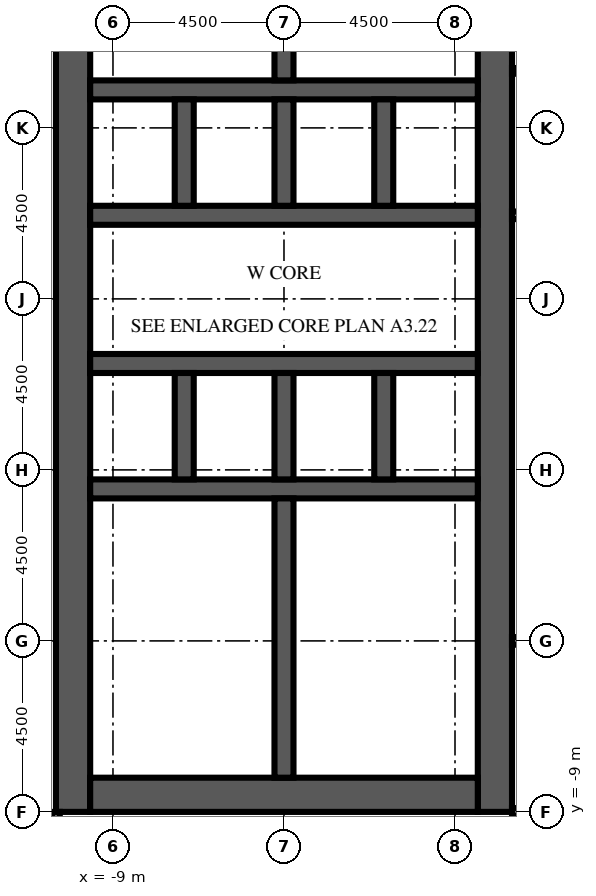
"""IFC4 building model, lengths in metres.
Left out: names, types, materials, properties, quantities, classifications, styles, units other than length and angle.
Written with IfcOpenShell. Run it as: python <this file> out.ifc"""

import sys

from ifc_helpers import new_model, si_unit, direction, frame, frame_2d, origin, place, context, subcontext, project, spatial, rectangle, extrude, element, fill, save


model = new_model("IFC4")
c1 = context("Model", 3, precision=1e-05, world=origin(), true_north=direction((0.0, 1.0)))
c2 = subcontext(c1, "Body", "Model", "MODEL_VIEW")
j1 = project(units=[si_unit("LENGTHUNIT", "METRE"), si_unit("PLANEANGLEUNIT", "RADIAN")], contexts=[c1])
p1 = place(None, origin())
s1 = spatial("IfcSite", under=j1, at=p1, CompositionType="ELEMENT")
p2 = place(p1, origin())
s2 = spatial("IfcBuilding", under=s1, at=p2, CompositionType="ELEMENT")
p3 = place(p2, frame((0.0, 0.0, 141.3)))
s3 = spatial("IfcBuildingStorey", under=s2, at=p3, CompositionType="ELEMENT", Elevation=141.3)
p4 = place(p3, frame((-10.05, -9.0, 0.0), z_axis=(0.0, 0.0, 1.0), x_axis=(0.0, 1.0, 0.0)))
e1 = element("IfcWall", 1, at=p4, inside=s3, PredefinedType="SHEAR", context=c2, shape_type="SweptSolid", body=[
    extrude(rectangle(XDim=27.5, YDim=0.9, at=frame_2d((13.75, 0.0))), origin(), (0.0, 0.0, 1.0), 4.1),
])
p5 = place(p4, frame((12.55, 0.0, 0.0)))
e2 = element("IfcOpeningElement", 2, at=p5, cuts=e1, PredefinedType="OPENING", context=c2, shape_type="SweptSolid", body=[
    extrude(rectangle(XDim=2.4, YDim=2.4, at=frame_2d((1.2, 1.2))), frame((0.0, 0.46, 0.0), z_axis=(0.0, -1.0, 0.0), x_axis=(1.0, 0.0, 0.0)), (0.0, 0.0, 1.0), 0.92),
])
p6 = place(p4, frame((6.825, 0.0, 0.0)))
e3 = element("IfcOpeningElement", 3, at=p6, cuts=e1, PredefinedType="OPENING", context=c2, shape_type="SweptSolid", body=[
    extrude(rectangle(XDim=1.2, YDim=2.1, at=frame_2d((0.6, 1.05))), frame((0.0, 0.46, 0.0), z_axis=(0.0, -1.0, 0.0), x_axis=(1.0, 0.0, 0.0)), (0.0, 0.0, 1.0), 0.92),
])
p7 = place(p4, frame((19.475, 0.0, 0.0)))
e4 = element("IfcOpeningElement", 4, at=p7, cuts=e1, PredefinedType="OPENING", context=c2, shape_type="SweptSolid", body=[
    extrude(rectangle(XDim=1.2, YDim=2.1, at=frame_2d((0.6, 1.05))), frame((0.0, 0.46, 0.0), z_axis=(0.0, -1.0, 0.0), x_axis=(1.0, 0.0, 0.0)), (0.0, 0.0, 1.0), 0.92),
])
p8 = place(p3, frame((1.05, -9.0, 0.0), z_axis=(0.0, 0.0, 1.0), x_axis=(0.0, 1.0, 0.0)))
e5 = element("IfcWall", 5, at=p8, inside=s3, PredefinedType="SHEAR", context=c2, shape_type="SweptSolid", body=[
    extrude(rectangle(XDim=27.5, YDim=0.9, at=frame_2d((13.75, 0.0))), origin(), (0.0, 0.0, 1.0), 4.1),
])
p9 = place(p8, frame((12.55, 0.0, 0.0)))
e6 = element("IfcOpeningElement", 6, at=p9, cuts=e5, PredefinedType="OPENING", context=c2, shape_type="SweptSolid", body=[
    extrude(rectangle(XDim=2.4, YDim=2.4, at=frame_2d((1.2, 1.2))), frame((0.0, 0.46, 0.0), z_axis=(0.0, -1.0, 0.0), x_axis=(1.0, 0.0, 0.0)), (0.0, 0.0, 1.0), 0.92),
])
p10 = place(p8, frame((5.51, 0.0, 0.0)))
e7 = element("IfcOpeningElement", 7, at=p10, cuts=e5, PredefinedType="OPENING", context=c2, shape_type="SweptSolid", body=[
    extrude(rectangle(XDim=0.923, YDim=2.1, at=frame_2d((0.461, 1.05))), frame((0.0, 0.46, 0.0), z_axis=(0.0, -1.0, 0.0), x_axis=(1.0, 0.0, 0.0)), (0.0, 0.0, 1.0), 0.92),
])
p11 = place(p8, frame((23.427, 0.0, 0.0)))
e8 = element("IfcOpeningElement", 8, at=p11, cuts=e5, PredefinedType="OPENING", context=c2, shape_type="SweptSolid", body=[
    extrude(rectangle(XDim=1.2, YDim=2.1, at=frame_2d((0.6, 1.05))), frame((0.0, 0.46, 0.0), z_axis=(0.0, -1.0, 0.0), x_axis=(1.0, 0.0, 0.0)), (0.0, 0.0, 1.0), 0.92),
])
p12 = place(p3, frame((-9.6, -8.55, 0.0), z_axis=(0.0, 0.0, 1.0), x_axis=(1.0, 0.0, 0.0)))
e9 = element("IfcWall", 9, at=p12, inside=s3, PredefinedType="SHEAR", context=c2, shape_type="SweptSolid", body=[
    extrude(rectangle(XDim=10.2, YDim=0.9, at=frame_2d((5.1, 0.0))), origin(), (0.0, 0.0, 1.0), 4.1),
])
p13 = place(p3, frame((-9.6, -0.5, 0.0), z_axis=(0.0, 0.0, 1.0), x_axis=(1.0, 0.0, 0.0)))
e10 = element("IfcWall", 10, at=p13, inside=s3, PredefinedType="SHEAR", context=c2, shape_type="SweptSolid", body=[
    extrude(rectangle(XDim=10.2, YDim=0.5, at=frame_2d((5.1, 0.0))), origin(), (0.0, 0.0, 1.0), 4.1),
])
p14 = place(p3, frame((-9.6, 2.8, 0.0), z_axis=(0.0, 0.0, 1.0), x_axis=(1.0, 0.0, 0.0)))
e11 = element("IfcWall", 11, at=p14, inside=s3, PredefinedType="SHEAR", context=c2, shape_type="SweptSolid", body=[
    extrude(rectangle(XDim=10.2, YDim=0.5, at=frame_2d((5.1, 0.0))), origin(), (0.0, 0.0, 1.0), 4.1),
])
p15 = place(p14, frame((0.562, 0.0, 0.0)))
e12 = element("IfcOpeningElement", 12, at=p15, cuts=e11, PredefinedType="OPENING", context=c2, shape_type="SweptSolid", body=[
    extrude(rectangle(XDim=1.1, YDim=2.1, at=frame_2d((0.55, 1.05))), frame((0.0, 0.26, 0.0), z_axis=(0.0, -1.0, 0.0), x_axis=(1.0, 0.0, 0.0)), (0.0, 0.0, 1.0), 0.52),
])
p16 = place(p14, frame((3.238, 0.0, 0.0)))
e13 = element("IfcOpeningElement", 13, at=p16, cuts=e11, PredefinedType="OPENING", context=c2, shape_type="SweptSolid", body=[
    extrude(rectangle(XDim=1.1, YDim=2.1, at=frame_2d((0.55, 1.05))), frame((0.0, 0.26, 0.0), z_axis=(0.0, -1.0, 0.0), x_axis=(1.0, 0.0, 0.0)), (0.0, 0.0, 1.0), 0.52),
])
p17 = place(p14, frame((8.538, 0.0, 0.0)))
e14 = element("IfcOpeningElement", 14, at=p17, cuts=e11, PredefinedType="OPENING", context=c2, shape_type="SweptSolid", body=[
    extrude(rectangle(XDim=1.1, YDim=2.1, at=frame_2d((0.55, 1.05))), frame((0.0, 0.26, 0.0), z_axis=(0.0, -1.0, 0.0), x_axis=(1.0, 0.0, 0.0)), (0.0, 0.0, 1.0), 0.52),
])
p18 = place(p3, frame((-9.6, 6.7, 0.0), z_axis=(0.0, 0.0, 1.0), x_axis=(1.0, 0.0, 0.0)))
e15 = element("IfcWall", 15, at=p18, inside=s3, PredefinedType="SHEAR", context=c2, shape_type="SweptSolid", body=[
    extrude(rectangle(XDim=10.2, YDim=0.5, at=frame_2d((5.1, 0.0))), origin(), (0.0, 0.0, 1.0), 4.1),
])
p19 = place(p18, frame((0.562, 0.0, 0.0)))
e16 = element("IfcOpeningElement", 16, at=p19, cuts=e15, PredefinedType="OPENING", context=c2, shape_type="SweptSolid", body=[
    extrude(rectangle(XDim=1.1, YDim=2.1, at=frame_2d((0.55, 1.05))), frame((0.0, 0.26, 0.0), z_axis=(0.0, -1.0, 0.0), x_axis=(1.0, 0.0, 0.0)), (0.0, 0.0, 1.0), 0.52),
])
p20 = place(p18, frame((3.288, 0.0, 0.0)))
e17 = element("IfcOpeningElement", 17, at=p20, cuts=e15, PredefinedType="OPENING", context=c2, shape_type="SweptSolid", body=[
    extrude(rectangle(XDim=1.0, YDim=2.1, at=frame_2d((0.5, 1.05))), frame((0.0, 0.26, 0.0), z_axis=(0.0, -1.0, 0.0), x_axis=(1.0, 0.0, 0.0)), (0.0, 0.0, 1.0), 0.52),
])
p21 = place(p18, frame((5.913, 0.0, 0.0)))
e18 = element("IfcOpeningElement", 18, at=p21, cuts=e15, PredefinedType="OPENING", context=c2, shape_type="SweptSolid", body=[
    extrude(rectangle(XDim=1.0, YDim=2.1, at=frame_2d((0.5, 1.05))), frame((0.0, 0.26, 0.0), z_axis=(0.0, -1.0, 0.0), x_axis=(1.0, 0.0, 0.0)), (0.0, 0.0, 1.0), 0.52),
])
p22 = place(p18, frame((8.587, 0.0, 0.0)))
e19 = element("IfcOpeningElement", 19, at=p22, cuts=e15, PredefinedType="OPENING", context=c2, shape_type="SweptSolid", body=[
    extrude(rectangle(XDim=1.0, YDim=2.1, at=frame_2d((0.5, 1.05))), frame((0.0, 0.26, 0.0), z_axis=(0.0, -1.0, 0.0), x_axis=(1.0, 0.0, 0.0)), (0.0, 0.0, 1.0), 0.52),
])
p23 = place(p3, frame((-9.6, 10.0, 0.0), z_axis=(0.0, 0.0, 1.0), x_axis=(1.0, 0.0, 0.0)))
e20 = element("IfcWall", 20, at=p23, inside=s3, PredefinedType="SHEAR", context=c2, shape_type="SweptSolid", body=[
    extrude(rectangle(XDim=10.2, YDim=0.5, at=frame_2d((5.1, 0.0))), origin(), (0.0, 0.0, 1.0), 4.1),
])
for number, where, z_axis, x_axis in (
    (21, (-7.125, -0.25, 0.0), (0.0, 0.0, 1.0), (0.0, 1.0, 0.0)),
    (22, (-7.125, 6.95, 0.0), (0.0, 0.0, 1.0), (0.0, 1.0, 0.0)),
    (23, (-4.5, -0.25, 0.0), (0.0, 0.0, 1.0), (0.0, 1.0, 0.0)),
    (24, (-4.5, 6.95, 0.0), (0.0, 0.0, 1.0), (0.0, 1.0, 0.0)),
    (25, (-1.875, -0.25, 0.0), (0.0, 0.0, 1.0), (0.0, 1.0, 0.0)),
    (26, (-1.875, 6.95, 0.0), (0.0, 0.0, 1.0), (0.0, 1.0, 0.0)),
):
    element("IfcWall", number, at=place(p3, frame(where, z_axis=z_axis, x_axis=x_axis)), inside=s3, PredefinedType="SHEAR", context=c2, shape_type="SweptSolid", body=[
        extrude(rectangle(XDim=2.8, YDim=0.5, at=frame_2d((1.4, 0.0))), origin(), (0.0, 0.0, 1.0), 4.1),
    ])
for number, where, z_axis, x_axis in (
    (27, (-4.5, -8.1, 0.0), (0.0, 0.0, 1.0), (0.0, 1.0, 0.0)),
    (28, (-4.5, 10.25, 0.0), (0.0, 0.0, 1.0), (0.0, 1.0, 0.0)),
):
    element("IfcWall", number, at=place(p3, frame(where, z_axis=z_axis, x_axis=x_axis)), inside=s3, PredefinedType="SHEAR", context=c2, shape_type="SweptSolid", body=[
        extrude(rectangle(XDim=7.35, YDim=0.5, at=frame_2d((3.675, 0.0))), origin(), (0.0, 0.0, 1.0), 4.1),
    ])
p24 = place(p3, frame((-1.825, -3.69, 0.0), z_axis=(0.0, 0.0, 1.0), x_axis=(1.0, 0.0, 0.0)))
e29 = element("IfcWall", 29, at=p24, inside=s3, PredefinedType="PARTITIONING", context=c2, shape_type="SweptSolid", body=[
    extrude(rectangle(XDim=2.425, YDim=0.1, at=frame_2d((1.212, 0.0))), origin(), (0.0, 0.0, 1.0), 3.5),
])
p25 = place(p24, frame((0.712, 0.0, 0.0)))
e30 = element("IfcOpeningElement", 30, at=p25, cuts=e29, PredefinedType="OPENING", context=c2, shape_type="SweptSolid", body=[
    extrude(rectangle(XDim=1.0, YDim=2.1, at=frame_2d((0.5, 1.05))), frame((0.0, 0.06, 0.0), z_axis=(0.0, -1.0, 0.0), x_axis=(1.0, 0.0, 0.0)), (0.0, 0.0, 1.0), 0.12),
])
p26 = place(p3, frame((-4.25, -3.69, 0.0), z_axis=(0.0, 0.0, 1.0), x_axis=(1.0, 0.0, 0.0)))
e31 = element("IfcWall", 31, at=p26, inside=s3, PredefinedType="PARTITIONING", context=c2, shape_type="SweptSolid", body=[
    extrude(rectangle(XDim=2.425, YDim=0.1, at=frame_2d((1.212, 0.0))), origin(), (0.0, 0.0, 1.0), 3.5),
])
p27 = place(p26, frame((0.712, 0.0, 0.0)))
e32 = element("IfcOpeningElement", 32, at=p27, cuts=e31, PredefinedType="OPENING", context=c2, shape_type="SweptSolid", body=[
    extrude(rectangle(XDim=1.0, YDim=2.1, at=frame_2d((0.5, 1.05))), frame((0.0, 0.06, 0.0), z_axis=(0.0, -1.0, 0.0), x_axis=(1.0, 0.0, 0.0)), (0.0, 0.0, 1.0), 0.12),
])
p28 = place(p3, frame((-1.825, -2.367, 0.0), z_axis=(0.0, 0.0, 1.0), x_axis=(1.0, 0.0, 0.0)))
e33 = element("IfcWall", 33, at=p28, inside=s3, PredefinedType="PARTITIONING", context=c2, shape_type="SweptSolid", body=[
    extrude(rectangle(XDim=2.425, YDim=0.1, at=frame_2d((1.212, 0.0))), origin(), (0.0, 0.0, 1.0), 3.5),
])
p29 = place(p28, frame((0.712, 0.0, 0.0)))
e34 = element("IfcOpeningElement", 34, at=p29, cuts=e33, PredefinedType="OPENING", context=c2, shape_type="SweptSolid", body=[
    extrude(rectangle(XDim=1.0, YDim=2.1, at=frame_2d((0.5, 1.05))), frame((0.0, 0.06, 0.0), z_axis=(0.0, -1.0, 0.0), x_axis=(1.0, 0.0, 0.0)), (0.0, 0.0, 1.0), 0.12),
])
p30 = place(p3, frame((-4.25, -2.367, 0.0), z_axis=(0.0, 0.0, 1.0), x_axis=(1.0, 0.0, 0.0)))
e35 = element("IfcWall", 35, at=p30, inside=s3, PredefinedType="PARTITIONING", context=c2, shape_type="SweptSolid", body=[
    extrude(rectangle(XDim=2.425, YDim=0.1, at=frame_2d((1.212, 0.0))), origin(), (0.0, 0.0, 1.0), 3.5),
])
p31 = place(p30, frame((0.712, 0.0, 0.0)))
e36 = element("IfcOpeningElement", 36, at=p31, cuts=e35, PredefinedType="OPENING", context=c2, shape_type="SweptSolid", body=[
    extrude(rectangle(XDim=1.0, YDim=2.1, at=frame_2d((0.5, 1.05))), frame((0.0, 0.06, 0.0), z_axis=(0.0, -1.0, 0.0), x_axis=(1.0, 0.0, 0.0)), (0.0, 0.0, 1.0), 0.12),
])
p32 = place(p3, frame((-1.825, -8.1, 0.0), z_axis=(0.0, 0.0, 1.0), x_axis=(0.0, 1.0, 0.0)))
e37 = element("IfcWall", 37, at=p32, inside=s3, PredefinedType="PARTITIONING", context=c2, shape_type="SweptSolid", body=[
    extrude(rectangle(XDim=4.41, YDim=0.1, at=frame_2d((2.205, 0.0))), origin(), (0.0, 0.0, 1.0), 3.5),
])
p33 = place(p3, frame((-1.825, -2.367, 0.0), z_axis=(0.0, 0.0, 1.0), x_axis=(0.0, 1.0, 0.0)))
e38 = element("IfcWall", 38, at=p33, inside=s3, PredefinedType="PARTITIONING", context=c2, shape_type="SweptSolid", body=[
    extrude(rectangle(XDim=1.617, YDim=0.1, at=frame_2d((0.809, 0.0))), origin(), (0.0, 0.0, 1.0), 3.5),
])
p34 = place(p3, frame((-10.5, -9.0, 0.0), z_axis=(0.0, 0.0, 1.0), x_axis=(0.0, -1.0, 0.0)))
e39 = element("IfcWall", 39, at=p34, inside=s3, PredefinedType="PARTITIONING", context=c2, shape_type="SweptSolid", body=[
    extrude(rectangle(XDim=13.35, YDim=0.2, at=frame_2d((6.675, 0.0))), origin(), (0.0, 0.0, 1.0), 3.5),
])
p35 = place(p34, frame((4.4, 0.0, 0.0)))
e40 = element("IfcOpeningElement", 40, at=p35, cuts=e39, PredefinedType="OPENING", context=c2, shape_type="SweptSolid", body=[
    extrude(rectangle(XDim=1.0, YDim=2.1, at=frame_2d((0.5, 1.05))), frame((0.0, 0.11, 0.0), z_axis=(0.0, -1.0, 0.0), x_axis=(1.0, 0.0, 0.0)), (0.0, 0.0, 1.0), 0.22),
])
p36 = place(p3, frame((1.5, -9.0, 0.0), z_axis=(0.0, 0.0, 1.0), x_axis=(1.0, 0.0, 0.0)))
e41 = element("IfcWall", 41, at=p36, inside=s3, PredefinedType="PARTITIONING", context=c2, shape_type="SweptSolid", body=[
    extrude(rectangle(XDim=4.5, YDim=0.2, at=frame_2d((2.25, 0.0))), origin(), (0.0, 0.0, 1.0), 3.5),
])
p37 = place(p3, frame((6.0, -4.5, 0.0), z_axis=(0.0, 0.0, 1.0), x_axis=(-1.0, 0.0, 0.0)))
e42 = element("IfcWall", 42, at=p37, inside=s3, PredefinedType="PARTITIONING", context=c2, shape_type="SweptSolid", body=[
    extrude(rectangle(XDim=4.5, YDim=0.2, at=frame_2d((2.25, 0.0))), origin(), (0.0, 0.0, 1.0), 3.5),
])
p38 = place(p37, frame((1.4, 0.0, 0.0)))
e43 = element("IfcOpeningElement", 43, at=p38, cuts=e42, PredefinedType="OPENING", context=c2, shape_type="SweptSolid", body=[
    extrude(rectangle(XDim=1.0, YDim=2.1, at=frame_2d((0.5, 1.05))), frame((0.0, 0.11, 0.0), z_axis=(0.0, -1.0, 0.0), x_axis=(1.0, 0.0, 0.0)), (0.0, 0.0, 1.0), 0.22),
])
p39 = place(p3, frame((1.5, 6.7, 0.0), z_axis=(0.0, 0.0, 1.0), x_axis=(1.0, 0.0, 0.0)))
e44 = element("IfcWall", 44, at=p39, inside=s3, PredefinedType="PARTITIONING", context=c2, shape_type="SweptSolid", body=[
    extrude(rectangle(XDim=4.5, YDim=0.2, at=frame_2d((2.25, 0.0))), origin(), (0.0, 0.0, 1.0), 3.5),
])
p40 = place(p39, frame((2.35, 0.0, 0.0)))
e45 = element("IfcOpeningElement", 45, at=p40, cuts=e44, PredefinedType="OPENING", context=c2, shape_type="SweptSolid", body=[
    extrude(rectangle(XDim=1.0, YDim=2.1, at=frame_2d((0.5, 1.05))), frame((0.0, 0.11, 0.0), z_axis=(0.0, -1.0, 0.0), x_axis=(1.0, 0.0, 0.0)), (0.0, 0.0, 1.0), 0.22),
])
p41 = place(p3, frame((1.5, 10.5, 0.0), z_axis=(0.0, 0.0, 1.0), x_axis=(1.0, 0.0, 0.0)))
e46 = element("IfcWall", 46, at=p41, inside=s3, PredefinedType="PARTITIONING", context=c2, shape_type="SweptSolid", body=[
    extrude(rectangle(XDim=4.5, YDim=0.15, at=frame_2d((2.25, 0.0))), origin(), (0.0, 0.0, 1.0), 3.5),
])
p42 = place(p41, frame((2.35, 0.0, 0.0)))
e47 = element("IfcOpeningElement", 47, at=p42, cuts=e46, PredefinedType="OPENING", context=c2, shape_type="SweptSolid", body=[
    extrude(rectangle(XDim=1.0, YDim=2.1, at=frame_2d((0.5, 1.05))), frame((0.0, 0.085, 0.0), z_axis=(0.0, -1.0, 0.0), x_axis=(1.0, 0.0, 0.0)), (0.0, 0.0, 1.0), 0.17),
])
p43 = place(p15, origin())
e48 = element("IfcDoor", 48, at=p43, inside=s3, OperationType="DOUBLE_DOOR_SLIDING", PredefinedType="DOOR", context=c2, shape_type="SweptSolid", body=[
    extrude(rectangle(XDim=1.1, YDim=2.1, at=frame_2d((0.55, 1.05))), frame((0.0, 0.025, 0.0), z_axis=(0.0, -1.0, 0.0), x_axis=(1.0, 0.0, 0.0)), (0.0, 0.0, 1.0), 0.05),
])
fill(e12, e48)
p44 = place(p16, origin())
e49 = element("IfcDoor", 49, at=p44, inside=s3, OperationType="DOUBLE_DOOR_SLIDING", PredefinedType="DOOR", context=c2, shape_type="SweptSolid", body=[
    extrude(rectangle(XDim=1.1, YDim=2.1, at=frame_2d((0.55, 1.05))), frame((0.0, 0.025, 0.0), z_axis=(0.0, -1.0, 0.0), x_axis=(1.0, 0.0, 0.0)), (0.0, 0.0, 1.0), 0.05),
])
fill(e13, e49)
p45 = place(p17, origin())
e50 = element("IfcDoor", 50, at=p45, inside=s3, OperationType="DOUBLE_DOOR_SLIDING", PredefinedType="DOOR", context=c2, shape_type="SweptSolid", body=[
    extrude(rectangle(XDim=1.1, YDim=2.1, at=frame_2d((0.55, 1.05))), frame((0.0, 0.025, 0.0), z_axis=(0.0, -1.0, 0.0), x_axis=(1.0, 0.0, 0.0)), (0.0, 0.0, 1.0), 0.05),
])
fill(e14, e50)
p46 = place(p19, origin())
e51 = element("IfcDoor", 51, at=p46, inside=s3, OperationType="DOUBLE_DOOR_SLIDING", PredefinedType="DOOR", context=c2, shape_type="SweptSolid", body=[
    extrude(rectangle(XDim=1.1, YDim=2.1, at=frame_2d((0.55, 1.05))), frame((0.0, 0.025, 0.0), z_axis=(0.0, -1.0, 0.0), x_axis=(1.0, 0.0, 0.0)), (0.0, 0.0, 1.0), 0.05),
])
fill(e16, e51)
p47 = place(p5, origin())
e52 = element("IfcDoor", 52, at=p47, inside=s3, OperationType="DOUBLE_DOOR_DOUBLE_SWING", PredefinedType="DOOR", context=c2, shape_type="SweptSolid", body=[
    extrude(rectangle(XDim=2.4, YDim=2.4, at=frame_2d((1.2, 1.2))), frame((0.0, 0.025, 0.0), z_axis=(0.0, -1.0, 0.0), x_axis=(1.0, 0.0, 0.0)), (0.0, 0.0, 1.0), 0.05),
])
fill(e2, e52)
p48 = place(p9, origin())
e53 = element("IfcDoor", 53, at=p48, inside=s3, OperationType="DOUBLE_DOOR_DOUBLE_SWING", PredefinedType="DOOR", context=c2, shape_type="SweptSolid", body=[
    extrude(rectangle(XDim=2.4, YDim=2.4, at=frame_2d((1.2, 1.2))), frame((0.0, 0.025, 0.0), z_axis=(0.0, -1.0, 0.0), x_axis=(1.0, 0.0, 0.0)), (0.0, 0.0, 1.0), 0.05),
])
fill(e6, e53)
p49 = place(p6, origin())
e54 = element("IfcDoor", 54, at=p49, inside=s3, OperationType="SINGLE_SWING_LEFT", PredefinedType="DOOR", context=c2, shape_type="SweptSolid", body=[
    extrude(rectangle(XDim=1.2, YDim=2.1, at=frame_2d((0.6, 1.05))), frame((0.0, 0.025, 0.0), z_axis=(0.0, -1.0, 0.0), x_axis=(1.0, 0.0, 0.0)), (0.0, 0.0, 1.0), 0.05),
])
fill(e3, e54)
p50 = place(p7, origin())
e55 = element("IfcDoor", 55, at=p50, inside=s3, OperationType="SINGLE_SWING_LEFT", PredefinedType="DOOR", context=c2, shape_type="SweptSolid", body=[
    extrude(rectangle(XDim=1.2, YDim=2.1, at=frame_2d((0.6, 1.05))), frame((0.0, 0.025, 0.0), z_axis=(0.0, -1.0, 0.0), x_axis=(1.0, 0.0, 0.0)), (0.0, 0.0, 1.0), 0.05),
])
fill(e4, e55)
p51 = place(p20, origin())
e56 = element("IfcDoor", 56, at=p51, inside=s3, OperationType="SINGLE_SWING_RIGHT", PredefinedType="DOOR", context=c2, shape_type="SweptSolid", body=[
    extrude(rectangle(XDim=1.0, YDim=2.1, at=frame_2d((0.5, 1.05))), frame((0.0, 0.025, 0.0), z_axis=(0.0, -1.0, 0.0), x_axis=(1.0, 0.0, 0.0)), (0.0, 0.0, 1.0), 0.05),
])
fill(e17, e56)
p52 = place(p21, origin())
e57 = element("IfcDoor", 57, at=p52, inside=s3, OperationType="SINGLE_SWING_LEFT", PredefinedType="DOOR", context=c2, shape_type="SweptSolid", body=[
    extrude(rectangle(XDim=1.0, YDim=2.1, at=frame_2d((0.5, 1.05))), frame((0.0, 0.025, 0.0), z_axis=(0.0, -1.0, 0.0), x_axis=(1.0, 0.0, 0.0)), (0.0, 0.0, 1.0), 0.05),
])
fill(e18, e57)
p53 = place(p22, origin())
e58 = element("IfcDoor", 58, at=p53, inside=s3, OperationType="SINGLE_SWING_RIGHT", PredefinedType="DOOR", context=c2, shape_type="SweptSolid", body=[
    extrude(rectangle(XDim=1.0, YDim=2.1, at=frame_2d((0.5, 1.05))), frame((0.0, 0.025, 0.0), z_axis=(0.0, -1.0, 0.0), x_axis=(1.0, 0.0, 0.0)), (0.0, 0.0, 1.0), 0.05),
])
fill(e19, e58)
p54 = place(p10, origin())
e59 = element("IfcDoor", 59, at=p54, inside=s3, OperationType="SINGLE_SWING_LEFT", PredefinedType="DOOR", context=c2, shape_type="SweptSolid", body=[
    extrude(rectangle(XDim=0.923, YDim=2.1, at=frame_2d((0.461, 1.05))), frame((0.0, 0.425, 0.0), z_axis=(0.0, -1.0, 0.0), x_axis=(1.0, 0.0, 0.0)), (0.0, 0.0, 1.0), 0.05),
])
fill(e7, e59)
p55 = place(p25, origin())
e60 = element("IfcDoor", 60, at=p55, inside=s3, OperationType="SINGLE_SWING_RIGHT", PredefinedType="DOOR", context=c2, shape_type="SweptSolid", body=[
    extrude(rectangle(XDim=1.0, YDim=2.1, at=frame_2d((0.5, 1.05))), frame((0.0, 0.025, 0.0), z_axis=(0.0, -1.0, 0.0), x_axis=(1.0, 0.0, 0.0)), (0.0, 0.0, 1.0), 0.05),
])
fill(e30, e60)
p56 = place(p27, origin())
e61 = element("IfcDoor", 61, at=p56, inside=s3, OperationType="SINGLE_SWING_LEFT", PredefinedType="DOOR", context=c2, shape_type="SweptSolid", body=[
    extrude(rectangle(XDim=1.0, YDim=2.1, at=frame_2d((0.5, 1.05))), frame((0.0, 0.025, 0.0), z_axis=(0.0, -1.0, 0.0), x_axis=(1.0, 0.0, 0.0)), (0.0, 0.0, 1.0), 0.05),
])
fill(e32, e61)
p57 = place(p29, origin())
e62 = element("IfcDoor", 62, at=p57, inside=s3, OperationType="SINGLE_SWING_RIGHT", PredefinedType="DOOR", context=c2, shape_type="SweptSolid", body=[
    extrude(rectangle(XDim=1.0, YDim=2.1, at=frame_2d((0.5, 1.05))), frame((0.0, 0.025, 0.0), z_axis=(0.0, -1.0, 0.0), x_axis=(1.0, 0.0, 0.0)), (0.0, 0.0, 1.0), 0.05),
])
fill(e34, e62)
p58 = place(p31, origin())
e63 = element("IfcDoor", 63, at=p58, inside=s3, OperationType="SINGLE_SWING_LEFT", PredefinedType="DOOR", context=c2, shape_type="SweptSolid", body=[
    extrude(rectangle(XDim=1.0, YDim=2.1, at=frame_2d((0.5, 1.05))), frame((0.0, 0.025, 0.0), z_axis=(0.0, -1.0, 0.0), x_axis=(1.0, 0.0, 0.0)), (0.0, 0.0, 1.0), 0.05),
])
fill(e36, e63)
save(model, sys.argv[1])
